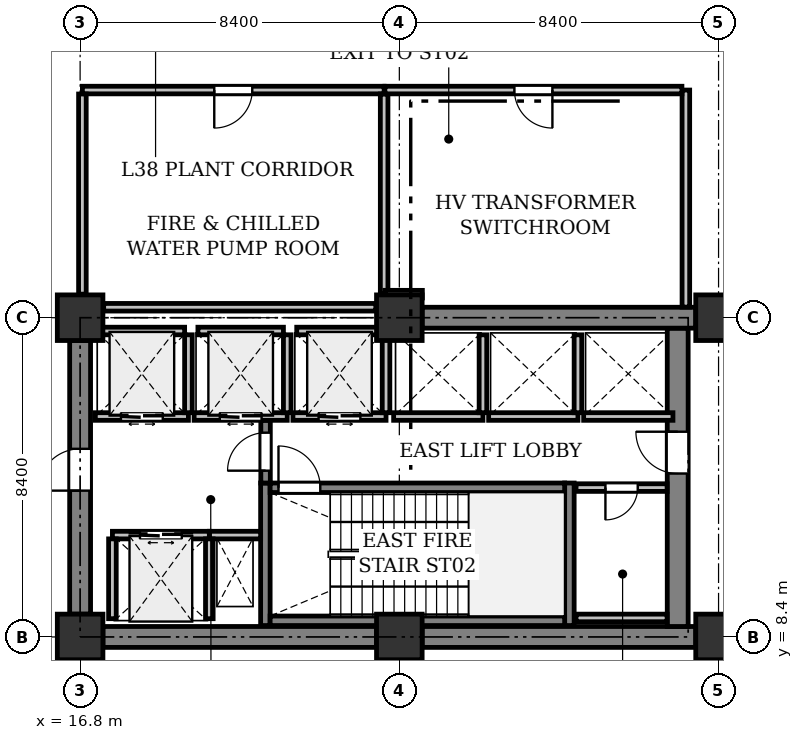
"""IFC4 building model, lengths in metres.
Left out: names, types, materials, properties, quantities, classifications, styles, units other than length and angle.
Written with IfcOpenShell. Run it as: python <this file> out.ifc"""

import sys

from ifc_helpers import new_model, si_unit, direction, frame, frame_2d, origin, origin_2d, place, context, subcontext, project, spatial, rectangle, extrude, element, fill, save


model = new_model("IFC4")
c1 = context("Model", 3, precision=1e-05, world=origin(), true_north=direction((0.0, 1.0)))
c2 = subcontext(c1, "Body", "Model", "MODEL_VIEW")
j1 = project(units=[si_unit("LENGTHUNIT", "METRE"), si_unit("PLANEANGLEUNIT", "RADIAN")], contexts=[c1])
p1 = place(None, origin())
s1 = spatial("IfcSite", under=j1, at=p1, CompositionType="ELEMENT")
p2 = place(p1, origin())
s2 = spatial("IfcBuilding", under=s1, at=p2, CompositionType="ELEMENT")
p3 = place(p2, frame((0.0, 0.0, 162.3)))
s3 = spatial("IfcBuildingStorey", under=s2, at=p3, CompositionType="ELEMENT", Elevation=162.3)
for number, where, z_axis, x_axis in (
    (1, (16.8, 8.4, 0.0), (0.0, 0.0, 1.0), (1.0, 0.0, 0.0)),
    (2, (16.8, 16.8, 0.0), (0.0, 0.0, 1.0), (1.0, 0.0, 0.0)),
    (3, (25.2, 8.4, 0.0), (0.0, 0.0, 1.0), (1.0, 0.0, 0.0)),
    (4, (25.2, 16.8, 0.0), (0.0, 0.0, 1.0), (1.0, 0.0, 0.0)),
    (5, (33.6, 8.4, 0.0), (0.0, 0.0, 1.0), (1.0, 0.0, 0.0)),
    (6, (33.6, 16.8, 0.0), (0.0, 0.0, 1.0), (1.0, 0.0, 0.0)),
):
    element("IfcColumn", number, at=place(p3, frame(where, z_axis=z_axis, x_axis=x_axis)), inside=s3, PredefinedType="COLUMN", context=c2, shape_type="SweptSolid", body=[
        extrude(rectangle(XDim=1.2, YDim=1.2, at=origin_2d()), origin(), (0.0, 0.0, 1.0), 5.0),
    ])
p4 = place(p3, frame((17.4, 8.4, 0.0), z_axis=(0.0, 0.0, 1.0), x_axis=(1.0, 0.0, 0.0)))
e7 = element("IfcWall", 7, at=p4, inside=s3, PredefinedType="SHEAR", context=c2, shape_type="SweptSolid", body=[
    extrude(rectangle(XDim=7.2, YDim=0.55, at=frame_2d((3.6, 0.0))), origin(), (0.0, 0.0, 1.0), 4.725),
])
p5 = place(p3, frame((25.8, 8.4, 0.0), z_axis=(0.0, 0.0, 1.0), x_axis=(1.0, 0.0, 0.0)))
e8 = element("IfcWall", 8, at=p5, inside=s3, PredefinedType="SHEAR", context=c2, shape_type="SweptSolid", body=[
    extrude(rectangle(XDim=7.2, YDim=0.55, at=frame_2d((3.6, 0.0))), origin(), (0.0, 0.0, 1.0), 4.725),
])
p6 = place(p3, frame((32.525, 8.675, 0.0), z_axis=(0.0, 0.0, 1.0), x_axis=(0.0, 1.0, 0.0)))
e9 = element("IfcWall", 9, at=p6, inside=s3, PredefinedType="SHEAR", context=c2, shape_type="SweptSolid", body=[
    extrude(rectangle(XDim=7.85, YDim=0.55, at=frame_2d((3.925, 0.0))), origin(), (0.0, 0.0, 1.0), 4.725),
])
p7 = place(p6, frame((4.025, 0.0, 0.0)))
e10 = element("IfcOpeningElement", 10, at=p7, cuts=e9, PredefinedType="OPENING", context=c2, shape_type="SweptSolid", body=[
    extrude(rectangle(XDim=1.1, YDim=2.15, at=frame_2d((0.55, 1.075))), frame((0.0, 0.285, 0.0), z_axis=(0.0, -1.0, 0.0), x_axis=(1.0, 0.0, 0.0)), (0.0, 0.0, 1.0), 0.57),
])
p8 = place(p3, frame((16.8, 9.0, 0.0), z_axis=(0.0, 0.0, 1.0), x_axis=(0.0, 1.0, 0.0)))
e11 = element("IfcWall", 11, at=p8, inside=s3, PredefinedType="SHEAR", context=c2, shape_type="SweptSolid", body=[
    extrude(rectangle(XDim=7.2, YDim=0.55, at=frame_2d((3.6, 0.0))), origin(), (0.0, 0.0, 1.0), 4.725),
])
p9 = place(p8, frame((3.25, 0.0, 0.0)))
e12 = element("IfcOpeningElement", 12, at=p9, cuts=e11, PredefinedType="OPENING", context=c2, shape_type="SweptSolid", body=[
    extrude(rectangle(XDim=1.1, YDim=2.15, at=frame_2d((0.55, 1.075))), frame((0.0, 0.285, 0.0), z_axis=(0.0, -1.0, 0.0), x_axis=(1.0, 0.0, 0.0)), (0.0, 0.0, 1.0), 0.57),
])
p10 = place(p3, frame((25.8, 16.8, 0.0), z_axis=(0.0, 0.0, 1.0), x_axis=(1.0, 0.0, 0.0)))
e13 = element("IfcWall", 13, at=p10, inside=s3, PredefinedType="SHEAR", context=c2, shape_type="SweptSolid", body=[
    extrude(rectangle(XDim=7.2, YDim=0.55, at=frame_2d((3.6, 0.0))), origin(), (0.0, 0.0, 1.0), 4.725),
])
for number, where, z_axis, x_axis in (
    (14, (21.675, 8.7, 0.0), (0.0, 0.0, 1.0), (0.0, 1.0, 0.0)),
    (15, (29.675, 8.7, 0.0), (0.0, 0.0, 1.0), (0.0, 1.0, 0.0)),
):
    element("IfcWall", number, at=place(p3, frame(where, z_axis=z_axis, x_axis=x_axis)), inside=s3, PredefinedType="SHEAR", context=c2, shape_type="SweptSolid", body=[
        extrude(rectangle(XDim=3.75, YDim=0.25, at=frame_2d((1.875, 0.0))), origin(), (0.0, 0.0, 1.0), 4.725),
    ])
p11 = place(p3, frame((21.8, 8.825, 0.0), z_axis=(0.0, 0.0, 1.0), x_axis=(1.0, 0.0, 0.0)))
e16 = element("IfcWall", 16, at=p11, inside=s3, PredefinedType="SHEAR", context=c2, shape_type="SweptSolid", body=[
    extrude(rectangle(XDim=7.75, YDim=0.25, at=frame_2d((3.875, 0.0))), origin(), (0.0, 0.0, 1.0), 4.725),
])
p12 = place(p3, frame((21.8, 12.325, 0.0), z_axis=(0.0, 0.0, 1.0), x_axis=(1.0, 0.0, 0.0)))
e17 = element("IfcWall", 17, at=p12, inside=s3, PredefinedType="SHEAR", context=c2, shape_type="SweptSolid", body=[
    extrude(rectangle(XDim=7.75, YDim=0.25, at=frame_2d((3.875, 0.0))), origin(), (0.0, 0.0, 1.0), 4.725),
])
p13 = place(p12, frame((0.22, 0.0, 0.0)))
e18 = element("IfcOpeningElement", 18, at=p13, cuts=e17, PredefinedType="OPENING", context=c2, shape_type="SweptSolid", body=[
    extrude(rectangle(XDim=1.1, YDim=2.15, at=frame_2d((0.55, 1.075))), frame((0.0, 0.135, 0.0), z_axis=(0.0, -1.0, 0.0), x_axis=(1.0, 0.0, 0.0)), (0.0, 0.0, 1.0), 0.27),
])
p14 = place(p3, frame((20.2, 11.08, 0.0), z_axis=(0.0, 0.0, 1.0), x_axis=(1.0, 0.0, 0.0)))
e19 = element("IfcWall", 19, at=p14, inside=s3, PredefinedType="PARTITIONING", context=c2, shape_type="SweptSolid", body=[
    extrude(rectangle(XDim=1.35, YDim=0.2, at=frame_2d((0.675, 0.0))), origin(), (0.0, 0.0, 1.0), 4.725),
])
p15 = place(p3, frame((21.68, 12.45, 0.0), z_axis=(0.0, 0.0, 1.0), x_axis=(0.0, 1.0, 0.0)))
e20 = element("IfcWall", 20, at=p15, inside=s3, PredefinedType="SHEAR", context=c2, shape_type="SweptSolid", body=[
    extrude(rectangle(XDim=1.65, YDim=0.25, at=frame_2d((0.825, 0.0))), origin(), (0.0, 0.0, 1.0), 4.725),
])
p16 = place(p15, frame((0.325, 0.0, 0.0)))
e21 = element("IfcOpeningElement", 21, at=p16, cuts=e20, PredefinedType="OPENING", context=c2, shape_type="SweptSolid", body=[
    extrude(rectangle(XDim=1.0, YDim=2.15, at=frame_2d((0.5, 1.075))), frame((0.0, 0.135, 0.0), z_axis=(0.0, -1.0, 0.0), x_axis=(1.0, 0.0, 0.0)), (0.0, 0.0, 1.0), 0.27),
])
p17 = place(p3, frame((17.65, 11.08, 0.0), z_axis=(0.0, 0.0, 1.0), x_axis=(1.0, 0.0, 0.0)))
e22 = element("IfcWall", 22, at=p17, inside=s3, PredefinedType="PARTITIONING", context=c2, shape_type="SweptSolid", body=[
    extrude(rectangle(XDim=2.55, YDim=0.2, at=frame_2d((1.275, 0.0))), origin(), (0.0, 0.0, 1.0), 4.725),
])
p18 = place(p17, frame((0.725, 0.0, 0.0)))
e23 = element("IfcOpeningElement", 23, at=p18, cuts=e22, PredefinedType="OPENING", context=c2, shape_type="SweptSolid", body=[
    extrude(rectangle(XDim=1.1, YDim=2.2, at=frame_2d((0.55, 1.1))), frame((0.0, 0.11, 0.0), z_axis=(0.0, -1.0, 0.0), x_axis=(1.0, 0.0, 0.0)), (0.0, 0.0, 1.0), 0.22),
])
for number, where, z_axis, x_axis in (
    (24, (20.2, 8.88, 0.0), (0.0, 0.0, 1.0), (0.0, 1.0, 0.0)),
    (25, (17.65, 8.88, 0.0), (0.0, 0.0, 1.0), (0.0, 1.0, 0.0)),
):
    element("IfcWall", number, at=place(p3, frame(where, z_axis=z_axis, x_axis=x_axis)), inside=s3, PredefinedType="PARTITIONING", context=c2, shape_type="SweptSolid", body=[
        extrude(rectangle(XDim=2.1, YDim=0.2, at=frame_2d((1.05, 0.0))), origin(), (0.0, 0.0, 1.0), 4.725),
    ])
p19 = place(p3, frame((17.2, 14.2, 0.0), z_axis=(0.0, 0.0, 1.0), x_axis=(1.0, 0.0, 0.0)))
e26 = element("IfcWall", 26, at=p19, inside=s3, PredefinedType="PARTITIONING", context=c2, shape_type="SweptSolid", body=[
    extrude(rectangle(XDim=2.45, YDim=0.2, at=frame_2d((1.225, 0.0))), origin(), (0.0, 0.0, 1.0), 4.725),
])
p20 = place(p19, frame((0.675, 0.0, 0.0)))
e27 = element("IfcOpeningElement", 27, at=p20, cuts=e26, PredefinedType="OPENING", context=c2, shape_type="SweptSolid", body=[
    extrude(rectangle(XDim=1.1, YDim=2.2, at=frame_2d((0.55, 1.1))), frame((0.0, 0.11, 0.0), z_axis=(0.0, -1.0, 0.0), x_axis=(1.0, 0.0, 0.0)), (0.0, 0.0, 1.0), 0.22),
])
p21 = place(p3, frame((19.65, 14.3, 0.0), z_axis=(0.0, 0.0, 1.0), x_axis=(0.0, 1.0, 0.0)))
e28 = element("IfcWall", 28, at=p21, inside=s3, PredefinedType="PARTITIONING", context=c2, shape_type="SweptSolid", body=[
    extrude(rectangle(XDim=2.05, YDim=0.2, at=frame_2d((1.025, 0.0))), origin(), (0.0, 0.0, 1.0), 4.725),
])
p22 = place(p3, frame((17.3, 16.45, 0.0), z_axis=(0.0, 0.0, 1.0), x_axis=(1.0, 0.0, 0.0)))
e29 = element("IfcWall", 29, at=p22, inside=s3, PredefinedType="PARTITIONING", context=c2, shape_type="SweptSolid", body=[
    extrude(rectangle(XDim=2.25, YDim=0.2, at=frame_2d((1.125, 0.0))), origin(), (0.0, 0.0, 1.0), 4.725),
])
p23 = place(p3, frame((19.8, 14.2, 0.0), z_axis=(0.0, 0.0, 1.0), x_axis=(1.0, 0.0, 0.0)))
e30 = element("IfcWall", 30, at=p23, inside=s3, PredefinedType="PARTITIONING", context=c2, shape_type="SweptSolid", body=[
    extrude(rectangle(XDim=2.45, YDim=0.2, at=frame_2d((1.225, 0.0))), origin(), (0.0, 0.0, 1.0), 4.725),
])
p24 = place(p23, frame((0.675, 0.0, 0.0)))
e31 = element("IfcOpeningElement", 31, at=p24, cuts=e30, PredefinedType="OPENING", context=c2, shape_type="SweptSolid", body=[
    extrude(rectangle(XDim=1.1, YDim=2.2, at=frame_2d((0.55, 1.1))), frame((0.0, 0.11, 0.0), z_axis=(0.0, -1.0, 0.0), x_axis=(1.0, 0.0, 0.0)), (0.0, 0.0, 1.0), 0.22),
])
p25 = place(p3, frame((22.25, 14.3, 0.0), z_axis=(0.0, 0.0, 1.0), x_axis=(0.0, 1.0, 0.0)))
e32 = element("IfcWall", 32, at=p25, inside=s3, PredefinedType="PARTITIONING", context=c2, shape_type="SweptSolid", body=[
    extrude(rectangle(XDim=2.05, YDim=0.2, at=frame_2d((1.025, 0.0))), origin(), (0.0, 0.0, 1.0), 4.725),
])
p26 = place(p3, frame((19.9, 16.45, 0.0), z_axis=(0.0, 0.0, 1.0), x_axis=(1.0, 0.0, 0.0)))
e33 = element("IfcWall", 33, at=p26, inside=s3, PredefinedType="PARTITIONING", context=c2, shape_type="SweptSolid", body=[
    extrude(rectangle(XDim=2.25, YDim=0.2, at=frame_2d((1.125, 0.0))), origin(), (0.0, 0.0, 1.0), 4.725),
])
p27 = place(p3, frame((22.4, 14.2, 0.0), z_axis=(0.0, 0.0, 1.0), x_axis=(1.0, 0.0, 0.0)))
e34 = element("IfcWall", 34, at=p27, inside=s3, PredefinedType="PARTITIONING", context=c2, shape_type="SweptSolid", body=[
    extrude(rectangle(XDim=2.45, YDim=0.2, at=frame_2d((1.225, 0.0))), origin(), (0.0, 0.0, 1.0), 4.725),
])
p28 = place(p27, frame((0.675, 0.0, 0.0)))
e35 = element("IfcOpeningElement", 35, at=p28, cuts=e34, PredefinedType="OPENING", context=c2, shape_type="SweptSolid", body=[
    extrude(rectangle(XDim=1.1, YDim=2.2, at=frame_2d((0.55, 1.1))), frame((0.0, 0.11, 0.0), z_axis=(0.0, -1.0, 0.0), x_axis=(1.0, 0.0, 0.0)), (0.0, 0.0, 1.0), 0.22),
])
p29 = place(p3, frame((24.85, 14.3, 0.0), z_axis=(0.0, 0.0, 1.0), x_axis=(0.0, 1.0, 0.0)))
e36 = element("IfcWall", 36, at=p29, inside=s3, PredefinedType="PARTITIONING", context=c2, shape_type="SweptSolid", body=[
    extrude(rectangle(XDim=2.05, YDim=0.2, at=frame_2d((1.025, 0.0))), origin(), (0.0, 0.0, 1.0), 4.725),
])
p30 = place(p3, frame((22.5, 16.45, 0.0), z_axis=(0.0, 0.0, 1.0), x_axis=(1.0, 0.0, 0.0)))
e37 = element("IfcWall", 37, at=p30, inside=s3, PredefinedType="PARTITIONING", context=c2, shape_type="SweptSolid", body=[
    extrude(rectangle(XDim=2.25, YDim=0.2, at=frame_2d((1.125, 0.0))), origin(), (0.0, 0.0, 1.0), 4.725),
])
p31 = place(p3, frame((25.05, 14.2, 0.0), z_axis=(0.0, 0.0, 1.0), x_axis=(1.0, 0.0, 0.0)))
e38 = element("IfcWall", 38, at=p31, inside=s3, PredefinedType="PARTITIONING", context=c2, shape_type="SweptSolid", body=[
    extrude(rectangle(XDim=2.35, YDim=0.2, at=frame_2d((1.175, 0.0))), origin(), (0.0, 0.0, 1.0), 4.725),
])
p32 = place(p3, frame((27.4, 14.3, 0.0), z_axis=(0.0, 0.0, 1.0), x_axis=(0.0, 1.0, 0.0)))
e39 = element("IfcWall", 39, at=p32, inside=s3, PredefinedType="PARTITIONING", context=c2, shape_type="SweptSolid", body=[
    extrude(rectangle(XDim=2.05, YDim=0.2, at=frame_2d((1.025, 0.0))), origin(), (0.0, 0.0, 1.0), 4.725),
])
p33 = place(p3, frame((27.55, 14.2, 0.0), z_axis=(0.0, 0.0, 1.0), x_axis=(1.0, 0.0, 0.0)))
e40 = element("IfcWall", 40, at=p33, inside=s3, PredefinedType="PARTITIONING", context=c2, shape_type="SweptSolid", body=[
    extrude(rectangle(XDim=2.35, YDim=0.2, at=frame_2d((1.175, 0.0))), origin(), (0.0, 0.0, 1.0), 4.725),
])
p34 = place(p3, frame((29.9, 14.3, 0.0), z_axis=(0.0, 0.0, 1.0), x_axis=(0.0, 1.0, 0.0)))
e41 = element("IfcWall", 41, at=p34, inside=s3, PredefinedType="PARTITIONING", context=c2, shape_type="SweptSolid", body=[
    extrude(rectangle(XDim=2.05, YDim=0.2, at=frame_2d((1.025, 0.0))), origin(), (0.0, 0.0, 1.0), 4.725),
])
p35 = place(p3, frame((30.05, 14.2, 0.0), z_axis=(0.0, 0.0, 1.0), x_axis=(1.0, 0.0, 0.0)))
e42 = element("IfcWall", 42, at=p35, inside=s3, PredefinedType="PARTITIONING", context=c2, shape_type="SweptSolid", body=[
    extrude(rectangle(XDim=2.35, YDim=0.2, at=frame_2d((1.175, 0.0))), origin(), (0.0, 0.0, 1.0), 4.725),
])
p36 = place(p3, frame((32.246, 12.33, 0.0), z_axis=(0.0, 0.0, 1.0), x_axis=(-1.0, 0.0, 0.0)))
e43 = element("IfcWall", 43, at=p36, inside=s3, PredefinedType="PARTITIONING", context=c2, shape_type="SweptSolid", body=[
    extrude(rectangle(XDim=2.396, YDim=0.2, at=frame_2d((1.198, 0.0))), origin(), (0.0, 0.0, 1.0), 4.725),
])
p37 = place(p36, frame((0.773, 0.0, 0.0)))
e44 = element("IfcOpeningElement", 44, at=p37, cuts=e43, PredefinedType="OPENING", context=c2, shape_type="SweptSolid", body=[
    extrude(rectangle(XDim=0.85, YDim=2.15, at=frame_2d((0.425, 1.075))), frame((0.0, 0.11, 0.0), z_axis=(0.0, -1.0, 0.0), x_axis=(1.0, 0.0, 0.0)), (0.0, 0.0, 1.0), 0.22),
])
p38 = place(p3, frame((29.85, 8.9, 0.0), z_axis=(0.0, 0.0, 1.0), x_axis=(1.0, 0.0, 0.0)))
e45 = element("IfcWall", 45, at=p38, inside=s3, PredefinedType="PARTITIONING", context=c2, shape_type="SweptSolid", body=[
    extrude(rectangle(XDim=2.396, YDim=0.2, at=frame_2d((1.198, 0.0))), origin(), (0.0, 0.0, 1.0), 4.725),
])
p39 = place(p3, frame((24.8, 22.79, 0.0), z_axis=(0.0, 0.0, 1.0), x_axis=(-1.0, 0.0, 0.0)))
e46 = element("IfcWall", 46, at=p39, inside=s3, PredefinedType="PARTITIONING", context=c2, shape_type="SweptSolid", body=[
    extrude(rectangle(XDim=7.94, YDim=0.2, at=frame_2d((3.97, 0.0))), origin(), (0.0, 0.0, 1.0), 3.709),
])
p40 = place(p39, frame((3.47, 0.0, 0.0)))
e47 = element("IfcOpeningElement", 47, at=p40, cuts=e46, PredefinedType="OPENING", context=c2, shape_type="SweptSolid", body=[
    extrude(rectangle(XDim=1.0, YDim=2.15, at=frame_2d((0.5, 1.075))), frame((0.0, 0.11, 0.0), z_axis=(0.0, -1.0, 0.0), x_axis=(1.0, 0.0, 0.0)), (0.0, 0.0, 1.0), 0.22),
])
p41 = place(p3, frame((16.86, 22.686, 0.0), z_axis=(0.0, 0.0, 1.0), x_axis=(0.0, -1.0, 0.0)))
e48 = element("IfcWall", 48, at=p41, inside=s3, PredefinedType="PARTITIONING", context=c2, shape_type="SweptSolid", body=[
    extrude(rectangle(XDim=5.266, YDim=0.2, at=frame_2d((2.633, 0.0))), origin(), (0.0, 0.0, 1.0), 3.709),
])
p42 = place(p3, frame((17.42, 17.075, 0.0), z_axis=(0.0, 0.0, 1.0), x_axis=(1.0, 0.0, 0.0)))
e49 = element("IfcWall", 49, at=p42, inside=s3, PredefinedType="PARTITIONING", context=c2, shape_type="SweptSolid", body=[
    extrude(rectangle(XDim=7.16, YDim=0.2, at=frame_2d((3.58, 0.0))), origin(), (0.0, 0.0, 1.0), 3.825),
])
p43 = place(p3, frame((24.8, 17.42, 0.0), z_axis=(0.0, 0.0, 1.0), x_axis=(0.0, 1.0, 0.0)))
e50 = element("IfcWall", 50, at=p43, inside=s3, PredefinedType="PARTITIONING", context=c2, shape_type="SweptSolid", body=[
    extrude(rectangle(XDim=5.266, YDim=0.2, at=frame_2d((2.633, 0.0))), origin(), (0.0, 0.0, 1.0), 4.725),
])
p44 = place(p3, frame((32.74, 17.079, 0.0), z_axis=(0.0, 0.0, 1.0), x_axis=(0.0, 1.0, 0.0)))
e51 = element("IfcWall", 51, at=p44, inside=s3, PredefinedType="PARTITIONING", context=c2, shape_type="SweptSolid", body=[
    extrude(rectangle(XDim=5.711, YDim=0.2, at=frame_2d((2.855, 0.0))), origin(), (0.0, 0.0, 1.0), 4.725),
])
p45 = place(p3, frame((32.636, 22.79, 0.0), z_axis=(0.0, 0.0, 1.0), x_axis=(-1.0, 0.0, 0.0)))
e52 = element("IfcWall", 52, at=p45, inside=s3, PredefinedType="PARTITIONING", context=c2, shape_type="SweptSolid", body=[
    extrude(rectangle(XDim=7.816, YDim=0.2, at=frame_2d((3.908, 0.0))), origin(), (0.0, 0.0, 1.0), 3.709),
])
p46 = place(p45, frame((3.408, 0.0, 0.0)))
e53 = element("IfcOpeningElement", 53, at=p46, cuts=e52, PredefinedType="OPENING", context=c2, shape_type="SweptSolid", body=[
    extrude(rectangle(XDim=1.0, YDim=2.15, at=frame_2d((0.5, 1.075))), frame((0.0, 0.11, 0.0), z_axis=(0.0, -1.0, 0.0), x_axis=(1.0, 0.0, 0.0)), (0.0, 0.0, 1.0), 0.22),
])
p47 = place(p3, frame((24.82, 17.42, 0.0), z_axis=(0.0, 0.0, 1.0), x_axis=(0.999999724019, -0.000742941845, 0.0)))
e54 = element("IfcWall", 54, at=p47, inside=s3, PredefinedType="PARTITIONING", context=c2, shape_type="SweptSolid", body=[
    extrude(rectangle(XDim=0.986, YDim=0.2, at=frame_2d((0.493, 0.0))), origin(), (0.0, 0.0, 1.0), 3.709),
])
p48 = place(p7, origin())
e55 = element("IfcDoor", 55, at=p48, inside=s3, OperationType="SINGLE_SWING_RIGHT", PredefinedType="DOOR", context=c2, shape_type="SweptSolid", body=[
    extrude(rectangle(XDim=1.1, YDim=2.15, at=frame_2d((0.55, 1.075))), frame((0.0, 0.025, 0.0), z_axis=(0.0, -1.0, 0.0), x_axis=(1.0, 0.0, 0.0)), (0.0, 0.0, 1.0), 0.05),
])
fill(e10, e55)
p49 = place(p9, origin())
e56 = element("IfcDoor", 56, at=p49, inside=s3, OperationType="SINGLE_SWING_LEFT", PredefinedType="DOOR", context=c2, shape_type="SweptSolid", body=[
    extrude(rectangle(XDim=1.1, YDim=2.15, at=frame_2d((0.55, 1.075))), frame((0.0, 0.025, 0.0), z_axis=(0.0, -1.0, 0.0), x_axis=(1.0, 0.0, 0.0)), (0.0, 0.0, 1.0), 0.05),
])
fill(e12, e56)
p50 = place(p13, origin())
e57 = element("IfcDoor", 57, at=p50, inside=s3, OperationType="SINGLE_SWING_LEFT", PredefinedType="DOOR", context=c2, shape_type="SweptSolid", body=[
    extrude(rectangle(XDim=1.1, YDim=2.15, at=frame_2d((0.55, 1.075))), frame((0.0, 0.025, 0.0), z_axis=(0.0, -1.0, 0.0), x_axis=(1.0, 0.0, 0.0)), (0.0, 0.0, 1.0), 0.05),
])
fill(e18, e57)
p51 = place(p16, origin())
e58 = element("IfcDoor", 58, at=p51, inside=s3, OperationType="SINGLE_SWING_LEFT", PredefinedType="DOOR", context=c2, shape_type="SweptSolid", body=[
    extrude(rectangle(XDim=1.0, YDim=2.15, at=frame_2d((0.5, 1.075))), frame((0.0, 0.025, 0.0), z_axis=(0.0, -1.0, 0.0), x_axis=(1.0, 0.0, 0.0)), (0.0, 0.0, 1.0), 0.05),
])
fill(e21, e58)
p52 = place(p18, origin())
e59 = element("IfcDoor", 59, at=p52, inside=s3, OperationType="DOUBLE_DOOR_SLIDING", PredefinedType="DOOR", context=c2, shape_type="SweptSolid", body=[
    extrude(rectangle(XDim=1.1, YDim=2.2, at=frame_2d((0.55, 1.1))), frame((0.0, 0.025, 0.0), z_axis=(0.0, -1.0, 0.0), x_axis=(1.0, 0.0, 0.0)), (0.0, 0.0, 1.0), 0.05),
])
fill(e23, e59)
p53 = place(p20, origin())
e60 = element("IfcDoor", 60, at=p53, inside=s3, OperationType="DOUBLE_DOOR_SLIDING", PredefinedType="DOOR", context=c2, shape_type="SweptSolid", body=[
    extrude(rectangle(XDim=1.1, YDim=2.2, at=frame_2d((0.55, 1.1))), frame((0.0, 0.025, 0.0), z_axis=(0.0, -1.0, 0.0), x_axis=(1.0, 0.0, 0.0)), (0.0, 0.0, 1.0), 0.05),
])
fill(e27, e60)
p54 = place(p24, origin())
e61 = element("IfcDoor", 61, at=p54, inside=s3, OperationType="DOUBLE_DOOR_SLIDING", PredefinedType="DOOR", context=c2, shape_type="SweptSolid", body=[
    extrude(rectangle(XDim=1.1, YDim=2.2, at=frame_2d((0.55, 1.1))), frame((0.0, 0.025, 0.0), z_axis=(0.0, -1.0, 0.0), x_axis=(1.0, 0.0, 0.0)), (0.0, 0.0, 1.0), 0.05),
])
fill(e31, e61)
p55 = place(p28, origin())
e62 = element("IfcDoor", 62, at=p55, inside=s3, OperationType="DOUBLE_DOOR_SLIDING", PredefinedType="DOOR", context=c2, shape_type="SweptSolid", body=[
    extrude(rectangle(XDim=1.1, YDim=2.2, at=frame_2d((0.55, 1.1))), frame((0.0, 0.025, 0.0), z_axis=(0.0, -1.0, 0.0), x_axis=(1.0, 0.0, 0.0)), (0.0, 0.0, 1.0), 0.05),
])
fill(e35, e62)
p56 = place(p37, origin())
e63 = element("IfcDoor", 63, at=p56, inside=s3, OperationType="SINGLE_SWING_RIGHT", PredefinedType="DOOR", context=c2, shape_type="SweptSolid", body=[
    extrude(rectangle(XDim=0.85, YDim=2.15, at=frame_2d((0.425, 1.075))), frame((0.0, 0.025, 0.0), z_axis=(0.0, -1.0, 0.0), x_axis=(1.0, 0.0, 0.0)), (0.0, 0.0, 1.0), 0.05),
])
fill(e44, e63)
p57 = place(p40, origin())
e64 = element("IfcDoor", 64, at=p57, inside=s3, OperationType="SINGLE_SWING_RIGHT", PredefinedType="DOOR", context=c2, shape_type="SweptSolid", body=[
    extrude(rectangle(XDim=1.0, YDim=2.15, at=frame_2d((0.5, 1.075))), frame((0.0, 0.025, 0.0), z_axis=(0.0, -1.0, 0.0), x_axis=(1.0, 0.0, 0.0)), (0.0, 0.0, 1.0), 0.05),
])
fill(e47, e64)
p58 = place(p46, origin())
e65 = element("IfcDoor", 65, at=p58, inside=s3, OperationType="SINGLE_SWING_LEFT", PredefinedType="DOOR", context=c2, shape_type="SweptSolid", body=[
    extrude(rectangle(XDim=1.0, YDim=2.15, at=frame_2d((0.5, 1.075))), frame((0.0, 0.025, 0.0), z_axis=(0.0, -1.0, 0.0), x_axis=(1.0, 0.0, 0.0)), (0.0, 0.0, 1.0), 0.05),
])
fill(e53, e65)
save(model, sys.argv[1])
